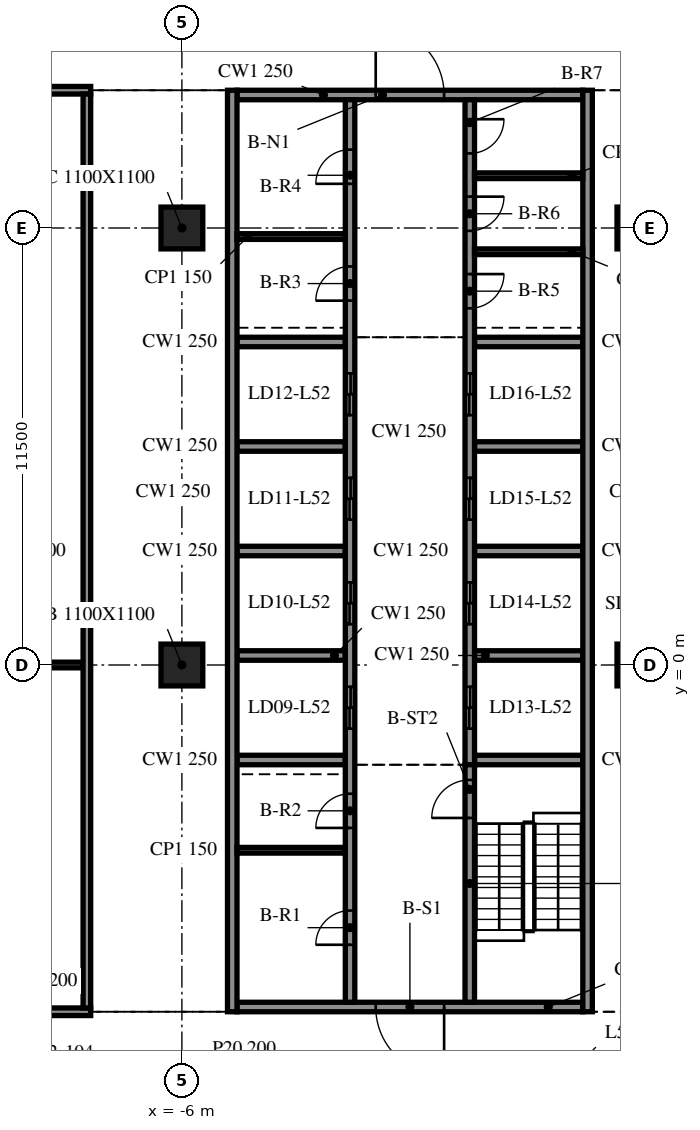
"""IFC4 building model, lengths in metres.
Left out: names, types, materials, properties, quantities, classifications, styles, units other than length and angle.
Written with IfcOpenShell. Run it as: python <this file> out.ifc"""

import sys

from ifc_helpers import new_model, si_unit, direction, frame, frame_2d, origin, origin_2d, place, context, subcontext, project, spatial, rectangle, extrude, element, fill, save


model = new_model("IFC4")
c1 = context("Model", 3, precision=1e-05, world=origin(), true_north=direction((0.0, 1.0)))
c2 = subcontext(c1, "Body", "Model", "MODEL_VIEW")
j1 = project(units=[si_unit("LENGTHUNIT", "METRE"), si_unit("PLANEANGLEUNIT", "RADIAN")], contexts=[c1])
p1 = place(None, origin())
s1 = spatial("IfcSite", under=j1, at=p1, CompositionType="ELEMENT")
p2 = place(p1, origin())
s2 = spatial("IfcBuilding", under=s1, at=p2, CompositionType="ELEMENT")
p3 = place(p2, frame((0.0, 0.0, 216.7)))
s3 = spatial("IfcBuildingStorey", under=s2, at=p3, CompositionType="ELEMENT", Elevation=216.7)
for number, where, z_axis, x_axis in (
    (1, (-6.0, 0.0, -0.34), (0.0, 0.0, 1.0), (1.0, 0.0, 0.0)),
    (2, (-6.0, 11.5, -0.34), (0.0, 0.0, 1.0), (1.0, 0.0, 0.0)),
    (3, (6.0, 0.0, -0.34), (0.0, 0.0, 1.0), (1.0, 0.0, 0.0)),
    (4, (6.0, 11.5, -0.34), (0.0, 0.0, 1.0), (1.0, 0.0, 0.0)),
):
    element("IfcColumn", number, at=place(p3, frame(where, z_axis=z_axis, x_axis=x_axis)), inside=s3, PredefinedType="COLUMN", context=c2, shape_type="SweptSolid", body=[
        extrude(rectangle(XDim=1.1, YDim=1.1, at=origin_2d()), origin(), (0.0, 0.0, 1.0), 3.8),
    ])
for number, where, z_axis, x_axis in (
    (5, (-4.675, 15.125, 0.0), (0.0, 0.0, 1.0), (0.0, -1.0, 0.0)),
    (6, (4.675, -9.125, 0.0), (0.0, 0.0, 1.0), (0.0, 1.0, 0.0)),
):
    element("IfcWall", number, at=place(p3, frame(where, z_axis=z_axis, x_axis=x_axis)), inside=s3, PredefinedType="SOLIDWALL", context=c2, shape_type="SweptSolid", body=[
        extrude(rectangle(XDim=24.25, YDim=0.25, at=frame_2d((12.125, 0.0))), origin(), (0.0, 0.0, 1.0), 3.46),
    ])
p4 = place(p3, frame((4.55, -9.0, 0.0), z_axis=(0.0, 0.0, 1.0), x_axis=(-1.0, 0.0, 0.0)))
e7 = element("IfcWall", 7, at=p4, inside=s3, PredefinedType="SOLIDWALL", context=c2, shape_type="SweptSolid", body=[
    extrude(rectangle(XDim=9.1, YDim=0.25, at=frame_2d((4.55, 0.0))), origin(), (0.0, 0.0, 1.0), 3.46),
])
p5 = place(p4, frame((3.65, 0.0, 0.0)))
e8 = element("IfcOpeningElement", 8, at=p5, cuts=e7, PredefinedType="OPENING", context=c2, shape_type="SweptSolid", body=[
    extrude(rectangle(XDim=1.8, YDim=2.1, at=frame_2d((0.9, 1.05))), frame((0.0, 0.135, 0.0), z_axis=(0.0, -1.0, 0.0), x_axis=(1.0, 0.0, 0.0)), (0.0, 0.0, 1.0), 0.27),
])
p6 = place(p3, frame((-4.55, 15.0, 0.0), z_axis=(0.0, 0.0, 1.0), x_axis=(1.0, 0.0, 0.0)))
e9 = element("IfcWall", 9, at=p6, inside=s3, PredefinedType="SOLIDWALL", context=c2, shape_type="SweptSolid", body=[
    extrude(rectangle(XDim=9.1, YDim=0.25, at=frame_2d((4.55, 0.0))), origin(), (0.0, 0.0, 1.0), 3.46),
])
p7 = place(p6, frame((3.65, 0.0, 0.0)))
e10 = element("IfcOpeningElement", 10, at=p7, cuts=e9, PredefinedType="OPENING", context=c2, shape_type="SweptSolid", body=[
    extrude(rectangle(XDim=1.8, YDim=2.1, at=frame_2d((0.9, 1.05))), frame((0.0, 0.135, 0.0), z_axis=(0.0, -1.0, 0.0), x_axis=(1.0, 0.0, 0.0)), (0.0, 0.0, 1.0), 0.27),
])
p8 = place(p3, frame((-1.575, -8.875, 0.0), z_axis=(0.0, 0.0, 1.0), x_axis=(0.0, 1.0, 0.0)))
e11 = element("IfcWall", 11, at=p8, inside=s3, PredefinedType="SOLIDWALL", context=c2, shape_type="SweptSolid", body=[
    extrude(rectangle(XDim=23.75, YDim=0.25, at=frame_2d((11.875, 0.0))), origin(), (0.0, 0.0, 1.0), 3.46),
])
p9 = place(p8, frame((7.2, 0.0, 0.0)))
e12 = element("IfcOpeningElement", 12, at=p9, cuts=e11, PredefinedType="OPENING", context=c2, shape_type="SweptSolid", body=[
    extrude(rectangle(XDim=1.1, YDim=2.1, at=frame_2d((0.55, 1.05))), frame((0.0, 0.135, 0.0), z_axis=(0.0, -1.0, 0.0), x_axis=(1.0, 0.0, 0.0)), (0.0, 0.0, 1.0), 0.27),
])
p10 = place(p8, frame((9.95, 0.0, 0.0)))
e13 = element("IfcOpeningElement", 13, at=p10, cuts=e11, PredefinedType="OPENING", context=c2, shape_type="SweptSolid", body=[
    extrude(rectangle(XDim=1.1, YDim=2.1, at=frame_2d((0.55, 1.05))), frame((0.0, 0.135, 0.0), z_axis=(0.0, -1.0, 0.0), x_axis=(1.0, 0.0, 0.0)), (0.0, 0.0, 1.0), 0.27),
])
p11 = place(p8, frame((12.7, 0.0, 0.0)))
e14 = element("IfcOpeningElement", 14, at=p11, cuts=e11, PredefinedType="OPENING", context=c2, shape_type="SweptSolid", body=[
    extrude(rectangle(XDim=1.1, YDim=2.1, at=frame_2d((0.55, 1.05))), frame((0.0, 0.135, 0.0), z_axis=(0.0, -1.0, 0.0), x_axis=(1.0, 0.0, 0.0)), (0.0, 0.0, 1.0), 0.27),
])
p12 = place(p8, frame((15.45, 0.0, 0.0)))
e15 = element("IfcOpeningElement", 15, at=p12, cuts=e11, PredefinedType="OPENING", context=c2, shape_type="SweptSolid", body=[
    extrude(rectangle(XDim=1.1, YDim=2.1, at=frame_2d((0.55, 1.05))), frame((0.0, 0.135, 0.0), z_axis=(0.0, -1.0, 0.0), x_axis=(1.0, 0.0, 0.0)), (0.0, 0.0, 1.0), 0.27),
])
p13 = place(p8, frame((1.512, 0.0, 0.0)))
e16 = element("IfcOpeningElement", 16, at=p13, cuts=e11, PredefinedType="OPENING", context=c2, shape_type="SweptSolid", body=[
    extrude(rectangle(XDim=0.9, YDim=2.1, at=frame_2d((0.45, 1.05))), frame((0.0, 0.135, 0.0), z_axis=(0.0, -1.0, 0.0), x_axis=(1.0, 0.0, 0.0)), (0.0, 0.0, 1.0), 0.27),
])
p14 = place(p8, frame((4.587, 0.0, 0.0)))
e17 = element("IfcOpeningElement", 17, at=p14, cuts=e11, PredefinedType="OPENING", context=c2, shape_type="SweptSolid", body=[
    extrude(rectangle(XDim=0.9, YDim=2.1, at=frame_2d((0.45, 1.05))), frame((0.0, 0.135, 0.0), z_axis=(0.0, -1.0, 0.0), x_axis=(1.0, 0.0, 0.0)), (0.0, 0.0, 1.0), 0.27),
])
p15 = place(p8, frame((18.462, 0.0, 0.0)))
e18 = element("IfcOpeningElement", 18, at=p15, cuts=e11, PredefinedType="OPENING", context=c2, shape_type="SweptSolid", body=[
    extrude(rectangle(XDim=0.9, YDim=2.1, at=frame_2d((0.45, 1.05))), frame((0.0, 0.135, 0.0), z_axis=(0.0, -1.0, 0.0), x_axis=(1.0, 0.0, 0.0)), (0.0, 0.0, 1.0), 0.27),
])
p16 = place(p8, frame((21.538, 0.0, 0.0)))
e19 = element("IfcOpeningElement", 19, at=p16, cuts=e11, PredefinedType="OPENING", context=c2, shape_type="SweptSolid", body=[
    extrude(rectangle(XDim=0.9, YDim=2.1, at=frame_2d((0.45, 1.05))), frame((0.0, 0.135, 0.0), z_axis=(0.0, -1.0, 0.0), x_axis=(1.0, 0.0, 0.0)), (0.0, 0.0, 1.0), 0.27),
])
p17 = place(p3, frame((1.575, -8.875, 0.0), z_axis=(0.0, 0.0, 1.0), x_axis=(0.0, 1.0, 0.0)))
e20 = element("IfcWall", 20, at=p17, inside=s3, PredefinedType="SOLIDWALL", context=c2, shape_type="SweptSolid", body=[
    extrude(rectangle(XDim=6.25, YDim=0.25, at=frame_2d((3.125, 0.0))), origin(), (0.0, 0.0, 1.0), 3.46),
])
p18 = place(p17, frame((4.85, 0.0, 0.0)))
e21 = element("IfcOpeningElement", 21, at=p18, cuts=e20, PredefinedType="OPENING", context=c2, shape_type="SweptSolid", body=[
    extrude(rectangle(XDim=1.0, YDim=2.1, at=frame_2d((0.5, 1.05))), frame((0.0, 0.135, 0.0), z_axis=(0.0, -1.0, 0.0), x_axis=(1.0, 0.0, 0.0)), (0.0, 0.0, 1.0), 0.27),
])
p19 = place(p3, frame((1.575, 14.875, 0.0), z_axis=(0.0, 0.0, 1.0), x_axis=(0.0, -1.0, 0.0)))
e22 = element("IfcWall", 22, at=p19, inside=s3, PredefinedType="SOLIDWALL", context=c2, shape_type="SweptSolid", body=[
    extrude(rectangle(XDim=17.5, YDim=0.25, at=frame_2d((8.75, 0.0))), origin(), (0.0, 0.0, 1.0), 3.46),
])
p20 = place(p19, frame((15.45, 0.0, 0.0)))
e23 = element("IfcOpeningElement", 23, at=p20, cuts=e22, PredefinedType="OPENING", context=c2, shape_type="SweptSolid", body=[
    extrude(rectangle(XDim=1.1, YDim=2.1, at=frame_2d((0.55, 1.05))), frame((0.0, 0.135, 0.0), z_axis=(0.0, -1.0, 0.0), x_axis=(1.0, 0.0, 0.0)), (0.0, 0.0, 1.0), 0.27),
])
p21 = place(p19, frame((12.7, 0.0, 0.0)))
e24 = element("IfcOpeningElement", 24, at=p21, cuts=e22, PredefinedType="OPENING", context=c2, shape_type="SweptSolid", body=[
    extrude(rectangle(XDim=1.1, YDim=2.1, at=frame_2d((0.55, 1.05))), frame((0.0, 0.135, 0.0), z_axis=(0.0, -1.0, 0.0), x_axis=(1.0, 0.0, 0.0)), (0.0, 0.0, 1.0), 0.27),
])
p22 = place(p19, frame((9.95, 0.0, 0.0)))
e25 = element("IfcOpeningElement", 25, at=p22, cuts=e22, PredefinedType="OPENING", context=c2, shape_type="SweptSolid", body=[
    extrude(rectangle(XDim=1.1, YDim=2.1, at=frame_2d((0.55, 1.05))), frame((0.0, 0.135, 0.0), z_axis=(0.0, -1.0, 0.0), x_axis=(1.0, 0.0, 0.0)), (0.0, 0.0, 1.0), 0.27),
])
p23 = place(p19, frame((7.2, 0.0, 0.0)))
e26 = element("IfcOpeningElement", 26, at=p23, cuts=e22, PredefinedType="OPENING", context=c2, shape_type="SweptSolid", body=[
    extrude(rectangle(XDim=1.1, YDim=2.1, at=frame_2d((0.55, 1.05))), frame((0.0, 0.135, 0.0), z_axis=(0.0, -1.0, 0.0), x_axis=(1.0, 0.0, 0.0)), (0.0, 0.0, 1.0), 0.27),
])
p24 = place(p19, frame((4.587, 0.0, 0.0)))
e27 = element("IfcOpeningElement", 27, at=p24, cuts=e22, PredefinedType="OPENING", context=c2, shape_type="SweptSolid", body=[
    extrude(rectangle(XDim=0.9, YDim=2.1, at=frame_2d((0.45, 1.05))), frame((0.0, 0.135, 0.0), z_axis=(0.0, -1.0, 0.0), x_axis=(1.0, 0.0, 0.0)), (0.0, 0.0, 1.0), 0.27),
])
p25 = place(p19, frame((2.55, 0.0, 0.0)))
e28 = element("IfcOpeningElement", 28, at=p25, cuts=e22, PredefinedType="OPENING", context=c2, shape_type="SweptSolid", body=[
    extrude(rectangle(XDim=0.9, YDim=2.1, at=frame_2d((0.45, 1.05))), frame((0.0, 0.135, 0.0), z_axis=(0.0, -1.0, 0.0), x_axis=(1.0, 0.0, 0.0)), (0.0, 0.0, 1.0), 0.27),
])
p26 = place(p19, frame((0.512, 0.0, 0.0)))
e29 = element("IfcOpeningElement", 29, at=p26, cuts=e22, PredefinedType="OPENING", context=c2, shape_type="SweptSolid", body=[
    extrude(rectangle(XDim=0.9, YDim=2.1, at=frame_2d((0.45, 1.05))), frame((0.0, 0.135, 0.0), z_axis=(0.0, -1.0, 0.0), x_axis=(1.0, 0.0, 0.0)), (0.0, 0.0, 1.0), 0.27),
])
for number, where, z_axis, x_axis in (
    (30, (-4.55, -2.5, 0.0), (0.0, 0.0, 1.0), (1.0, 0.0, 0.0)),
    (31, (-4.55, 0.25, 0.0), (0.0, 0.0, 1.0), (1.0, 0.0, 0.0)),
    (32, (-4.55, 3.0, 0.0), (0.0, 0.0, 1.0), (1.0, 0.0, 0.0)),
    (33, (-4.55, 5.75, 0.0), (0.0, 0.0, 1.0), (1.0, 0.0, 0.0)),
    (34, (-4.55, 8.5, 0.0), (0.0, 0.0, 1.0), (1.0, 0.0, 0.0)),
    (35, (1.7, -2.5, 0.0), (0.0, 0.0, 1.0), (1.0, 0.0, 0.0)),
    (36, (1.7, 0.25, 0.0), (0.0, 0.0, 1.0), (1.0, 0.0, 0.0)),
    (37, (1.7, 3.0, 0.0), (0.0, 0.0, 1.0), (1.0, 0.0, 0.0)),
    (38, (1.7, 5.75, 0.0), (0.0, 0.0, 1.0), (1.0, 0.0, 0.0)),
    (39, (1.7, 8.5, 0.0), (0.0, 0.0, 1.0), (1.0, 0.0, 0.0)),
):
    element("IfcWall", number, at=place(p3, frame(where, z_axis=z_axis, x_axis=x_axis)), inside=s3, PredefinedType="SOLIDWALL", context=c2, shape_type="SweptSolid", body=[
        extrude(rectangle(XDim=2.85, YDim=0.25, at=frame_2d((1.425, 0.0))), origin(), (0.0, 0.0, 1.0), 3.46),
    ])
for number, where, z_axis, x_axis in (
    (40, (-4.55, -4.875, 0.0), (0.0, 0.0, 1.0), (1.0, 0.0, 0.0)),
    (41, (-4.55, 11.275, 0.0), (0.0, 0.0, 1.0), (1.0, 0.0, 0.0)),
    (42, (1.7, 10.875, 0.0), (0.0, 0.0, 1.0), (1.0, 0.0, 0.0)),
    (43, (1.7, 12.875, 0.0), (0.0, 0.0, 1.0), (1.0, 0.0, 0.0)),
):
    element("IfcWall", number, at=place(p3, frame(where, z_axis=z_axis, x_axis=x_axis)), inside=s3, PredefinedType="PARTITIONING", context=c2, shape_type="SweptSolid", body=[
        extrude(rectangle(XDim=2.85, YDim=0.15, at=frame_2d((1.425, 0.0))), origin(), (0.0, 0.0, 1.0), 3.46),
    ])
p27 = place(p3, frame((-15.7, -9.125, 0.0), z_axis=(0.0, 0.0, 1.0), x_axis=(1.0, 0.0, 0.0)))
e44 = element("IfcWall", 44, at=p27, inside=s3, PredefinedType="PARTITIONING", context=c2, shape_type="SweptSolid", body=[
    extrude(rectangle(XDim=7.3, YDim=0.2, at=frame_2d((3.65, 0.0))), origin(), (0.0, 0.0, 1.0), 3.46),
])
p28 = place(p27, frame((3.1, 0.0, 0.0)))
e45 = element("IfcOpeningElement", 45, at=p28, cuts=e44, PredefinedType="OPENING", context=c2, shape_type="SweptSolid", body=[
    extrude(rectangle(XDim=0.9, YDim=2.1, at=frame_2d((0.45, 1.05))), frame((0.0, 0.11, 0.0), z_axis=(0.0, -1.0, 0.0), x_axis=(1.0, 0.0, 0.0)), (0.0, 0.0, 1.0), 0.22),
])
p29 = place(p3, frame((-15.5, 0.0, 0.0), z_axis=(0.0, 0.0, 1.0), x_axis=(1.0, 0.0, 0.0)))
e46 = element("IfcWall", 46, at=p29, inside=s3, PredefinedType="PARTITIONING", context=c2, shape_type="SweptSolid", body=[
    extrude(rectangle(XDim=6.9, YDim=0.15, at=frame_2d((3.45, 0.0))), origin(), (0.0, 0.0, 1.0), 3.46),
])
p30 = place(p3, frame((-15.7, 15.125, 0.0), z_axis=(0.0, 0.0, 1.0), x_axis=(1.0, 0.0, 0.0)))
e47 = element("IfcWall", 47, at=p30, inside=s3, PredefinedType="PARTITIONING", context=c2, shape_type="SweptSolid", body=[
    extrude(rectangle(XDim=7.3, YDim=0.2, at=frame_2d((3.65, 0.0))), origin(), (0.0, 0.0, 1.0), 3.46),
])
p31 = place(p3, frame((-8.5, -9.025, 0.0), z_axis=(0.0, 0.0, 1.0), x_axis=(0.0, 1.0, 0.0)))
e48 = element("IfcWall", 48, at=p31, inside=s3, PredefinedType="PARTITIONING", context=c2, shape_type="SweptSolid", body=[
    extrude(rectangle(XDim=24.05, YDim=0.2, at=frame_2d((12.025, 0.0))), origin(), (0.0, 0.0, 1.0), 3.46),
])
p32 = place(p5, origin())
e49 = element("IfcDoor", 49, at=p32, inside=s3, OperationType="DOUBLE_DOOR_SINGLE_SWING", PredefinedType="DOOR", context=c2, shape_type="SweptSolid", body=[
    extrude(rectangle(XDim=1.8, YDim=2.1, at=frame_2d((0.9, 1.05))), frame((0.0, 0.025, 0.0), z_axis=(0.0, -1.0, 0.0), x_axis=(1.0, 0.0, 0.0)), (0.0, 0.0, 1.0), 0.05),
])
fill(e8, e49)
p33 = place(p7, origin())
e50 = element("IfcDoor", 50, at=p33, inside=s3, OperationType="DOUBLE_DOOR_SINGLE_SWING", PredefinedType="DOOR", context=c2, shape_type="SweptSolid", body=[
    extrude(rectangle(XDim=1.8, YDim=2.1, at=frame_2d((0.9, 1.05))), frame((0.0, 0.025, 0.0), z_axis=(0.0, -1.0, 0.0), x_axis=(1.0, 0.0, 0.0)), (0.0, 0.0, 1.0), 0.05),
])
fill(e10, e50)
p34 = place(p20, origin())
e51 = element("IfcDoor", 51, at=p34, inside=s3, OperationType="DOUBLE_DOOR_SLIDING", PredefinedType="DOOR", context=c2, shape_type="SweptSolid", body=[
    extrude(rectangle(XDim=1.1, YDim=2.1, at=frame_2d((0.55, 1.05))), frame((0.0, 0.025, 0.0), z_axis=(0.0, -1.0, 0.0), x_axis=(1.0, 0.0, 0.0)), (0.0, 0.0, 1.0), 0.05),
])
fill(e23, e51)
p35 = place(p21, origin())
e52 = element("IfcDoor", 52, at=p35, inside=s3, OperationType="DOUBLE_DOOR_SLIDING", PredefinedType="DOOR", context=c2, shape_type="SweptSolid", body=[
    extrude(rectangle(XDim=1.1, YDim=2.1, at=frame_2d((0.55, 1.05))), frame((0.0, 0.025, 0.0), z_axis=(0.0, -1.0, 0.0), x_axis=(1.0, 0.0, 0.0)), (0.0, 0.0, 1.0), 0.05),
])
fill(e24, e52)
p36 = place(p22, origin())
e53 = element("IfcDoor", 53, at=p36, inside=s3, OperationType="DOUBLE_DOOR_SLIDING", PredefinedType="DOOR", context=c2, shape_type="SweptSolid", body=[
    extrude(rectangle(XDim=1.1, YDim=2.1, at=frame_2d((0.55, 1.05))), frame((0.0, 0.025, 0.0), z_axis=(0.0, -1.0, 0.0), x_axis=(1.0, 0.0, 0.0)), (0.0, 0.0, 1.0), 0.05),
])
fill(e25, e53)
p37 = place(p23, origin())
e54 = element("IfcDoor", 54, at=p37, inside=s3, OperationType="DOUBLE_DOOR_SLIDING", PredefinedType="DOOR", context=c2, shape_type="SweptSolid", body=[
    extrude(rectangle(XDim=1.1, YDim=2.1, at=frame_2d((0.55, 1.05))), frame((0.0, 0.025, 0.0), z_axis=(0.0, -1.0, 0.0), x_axis=(1.0, 0.0, 0.0)), (0.0, 0.0, 1.0), 0.05),
])
fill(e26, e54)
p38 = place(p9, origin())
e55 = element("IfcDoor", 55, at=p38, inside=s3, OperationType="DOUBLE_DOOR_SLIDING", PredefinedType="DOOR", context=c2, shape_type="SweptSolid", body=[
    extrude(rectangle(XDim=1.1, YDim=2.1, at=frame_2d((0.55, 1.05))), frame((0.0, 0.025, 0.0), z_axis=(0.0, -1.0, 0.0), x_axis=(1.0, 0.0, 0.0)), (0.0, 0.0, 1.0), 0.05),
])
fill(e12, e55)
p39 = place(p10, origin())
e56 = element("IfcDoor", 56, at=p39, inside=s3, OperationType="DOUBLE_DOOR_SLIDING", PredefinedType="DOOR", context=c2, shape_type="SweptSolid", body=[
    extrude(rectangle(XDim=1.1, YDim=2.1, at=frame_2d((0.55, 1.05))), frame((0.0, 0.025, 0.0), z_axis=(0.0, -1.0, 0.0), x_axis=(1.0, 0.0, 0.0)), (0.0, 0.0, 1.0), 0.05),
])
fill(e13, e56)
p40 = place(p11, origin())
e57 = element("IfcDoor", 57, at=p40, inside=s3, OperationType="DOUBLE_DOOR_SLIDING", PredefinedType="DOOR", context=c2, shape_type="SweptSolid", body=[
    extrude(rectangle(XDim=1.1, YDim=2.1, at=frame_2d((0.55, 1.05))), frame((0.0, 0.025, 0.0), z_axis=(0.0, -1.0, 0.0), x_axis=(1.0, 0.0, 0.0)), (0.0, 0.0, 1.0), 0.05),
])
fill(e14, e57)
p41 = place(p12, origin())
e58 = element("IfcDoor", 58, at=p41, inside=s3, OperationType="DOUBLE_DOOR_SLIDING", PredefinedType="DOOR", context=c2, shape_type="SweptSolid", body=[
    extrude(rectangle(XDim=1.1, YDim=2.1, at=frame_2d((0.55, 1.05))), frame((0.0, 0.025, 0.0), z_axis=(0.0, -1.0, 0.0), x_axis=(1.0, 0.0, 0.0)), (0.0, 0.0, 1.0), 0.05),
])
fill(e15, e58)
p42 = place(p13, origin())
e59 = element("IfcDoor", 59, at=p42, inside=s3, OperationType="SINGLE_SWING_LEFT", PredefinedType="DOOR", context=c2, shape_type="SweptSolid", body=[
    extrude(rectangle(XDim=0.9, YDim=2.1, at=frame_2d((0.45, 1.05))), frame((0.0, 0.025, 0.0), z_axis=(0.0, -1.0, 0.0), x_axis=(1.0, 0.0, 0.0)), (0.0, 0.0, 1.0), 0.05),
])
fill(e16, e59)
p43 = place(p14, origin())
e60 = element("IfcDoor", 60, at=p43, inside=s3, OperationType="SINGLE_SWING_RIGHT", PredefinedType="DOOR", context=c2, shape_type="SweptSolid", body=[
    extrude(rectangle(XDim=0.9, YDim=2.1, at=frame_2d((0.45, 1.05))), frame((0.0, 0.025, 0.0), z_axis=(0.0, -1.0, 0.0), x_axis=(1.0, 0.0, 0.0)), (0.0, 0.0, 1.0), 0.05),
])
fill(e17, e60)
p44 = place(p15, origin())
e61 = element("IfcDoor", 61, at=p44, inside=s3, OperationType="SINGLE_SWING_LEFT", PredefinedType="DOOR", context=c2, shape_type="SweptSolid", body=[
    extrude(rectangle(XDim=0.9, YDim=2.1, at=frame_2d((0.45, 1.05))), frame((0.0, 0.025, 0.0), z_axis=(0.0, -1.0, 0.0), x_axis=(1.0, 0.0, 0.0)), (0.0, 0.0, 1.0), 0.05),
])
fill(e18, e61)
p45 = place(p16, origin())
e62 = element("IfcDoor", 62, at=p45, inside=s3, OperationType="SINGLE_SWING_RIGHT", PredefinedType="DOOR", context=c2, shape_type="SweptSolid", body=[
    extrude(rectangle(XDim=0.9, YDim=2.1, at=frame_2d((0.45, 1.05))), frame((0.0, 0.025, 0.0), z_axis=(0.0, -1.0, 0.0), x_axis=(1.0, 0.0, 0.0)), (0.0, 0.0, 1.0), 0.05),
])
fill(e19, e62)
p46 = place(p24, origin())
e63 = element("IfcDoor", 63, at=p46, inside=s3, OperationType="SINGLE_SWING_LEFT", PredefinedType="DOOR", context=c2, shape_type="SweptSolid", body=[
    extrude(rectangle(XDim=0.9, YDim=2.1, at=frame_2d((0.45, 1.05))), frame((0.0, 0.025, 0.0), z_axis=(0.0, -1.0, 0.0), x_axis=(1.0, 0.0, 0.0)), (0.0, 0.0, 1.0), 0.05),
])
fill(e27, e63)
p47 = place(p25, origin())
e64 = element("IfcDoor", 64, at=p47, inside=s3, OperationType="SINGLE_SWING_RIGHT", PredefinedType="DOOR", context=c2, shape_type="SweptSolid", body=[
    extrude(rectangle(XDim=0.9, YDim=2.1, at=frame_2d((0.45, 1.05))), frame((0.0, 0.025, 0.0), z_axis=(0.0, -1.0, 0.0), x_axis=(1.0, 0.0, 0.0)), (0.0, 0.0, 1.0), 0.05),
])
fill(e28, e64)
p48 = place(p26, origin())
e65 = element("IfcDoor", 65, at=p48, inside=s3, OperationType="SINGLE_SWING_LEFT", PredefinedType="DOOR", context=c2, shape_type="SweptSolid", body=[
    extrude(rectangle(XDim=0.9, YDim=2.1, at=frame_2d((0.45, 1.05))), frame((0.0, 0.025, 0.0), z_axis=(0.0, -1.0, 0.0), x_axis=(1.0, 0.0, 0.0)), (0.0, 0.0, 1.0), 0.05),
])
fill(e29, e65)
p49 = place(p18, origin())
e66 = element("IfcDoor", 66, at=p49, inside=s3, OperationType="SINGLE_SWING_RIGHT", PredefinedType="DOOR", context=c2, shape_type="SweptSolid", body=[
    extrude(rectangle(XDim=1.0, YDim=2.1, at=frame_2d((0.5, 1.05))), frame((0.0, 0.025, 0.0), z_axis=(0.0, -1.0, 0.0), x_axis=(1.0, 0.0, 0.0)), (0.0, 0.0, 1.0), 0.05),
])
fill(e21, e66)
save(model, sys.argv[1])
